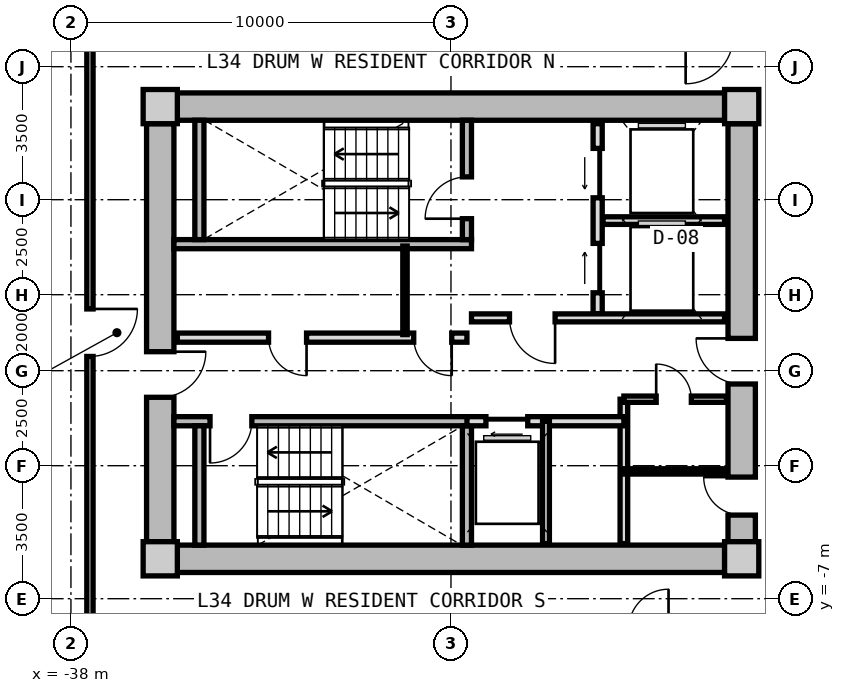
"""IFC4 building model, lengths in metres.
Left out: names, types, materials, properties, quantities, classifications, styles, units other than length and angle.
Written with IfcOpenShell. Run it as: python <this file> out.ifc"""

import sys

from ifc_helpers import new_model, si_unit, direction, frame, frame_2d, origin, origin_2d, place, context, subcontext, project, spatial, rectangle, extrude, source, transform, mapped, element, fill, save


model = new_model("IFC4")
c1 = context("Model", 3, precision=1e-05, world=origin(), true_north=direction((0.0, 1.0)))
c2 = subcontext(c1, "Body", "Model", "MODEL_VIEW")
j1 = project(units=[si_unit("LENGTHUNIT", "METRE"), si_unit("PLANEANGLEUNIT", "RADIAN")], contexts=[c1])
p1 = place(None, origin())
s1 = spatial("IfcSite", under=j1, at=p1, CompositionType="ELEMENT")
p2 = place(p1, origin())
s2 = spatial("IfcBuilding", under=s1, at=p2, CompositionType="ELEMENT")
p3 = place(p2, frame((0.0, 0.0, 111.5)))
s3 = spatial("IfcBuildingStorey", under=s2, at=p3, CompositionType="ELEMENT", Elevation=111.5)
m1 = source(origin(), c2, "Body", "SweptSolid", [
    extrude(rectangle(XDim=0.9, YDim=0.9, at=origin_2d()), origin(), (0.0, 0.0, 1.0), 3.05),
])
for number, where, z_axis, x_axis in (
    (1, (-35.65, -5.95, 0.0), (0.0, 0.0, 1.0), (1.0, 0.0, 0.0)),
    (2, (-20.35, -5.95, 0.0), (0.0, 0.0, 1.0), (1.0, 0.0, 0.0)),
    (3, (-20.35, 5.95, 0.0), (0.0, 0.0, 1.0), (1.0, 0.0, 0.0)),
    (4, (-35.65, 5.95, 0.0), (0.0, 0.0, 1.0), (1.0, 0.0, 0.0)),
):
    element("IfcColumn", number, at=place(p3, frame(where, z_axis=z_axis, x_axis=x_axis)), inside=s3, PredefinedType="COLUMN", context=c2, shape_type="MappedRepresentation", body=[
        mapped(m1, transform((0.0, 0.0, 0.0), x_axis=(1.0, 0.0, 0.0), y_axis=(0.0, 1.0, 0.0), z_axis=(0.0, 0.0, 1.0), scale=1.0)),
    ])
m2 = source(origin(), c2, "Body", "SweptSolid", [
    extrude(rectangle(XDim=14.4, YDim=0.72, at=frame_2d((7.2, 0.0))), origin(), (0.0, 0.0, 1.0), 2.79),
])
for number, where, z_axis, x_axis in (
    (5, (-35.2, 5.95, 0.0), (0.0, 0.0, 1.0), (1.0, 0.0, 0.0)),
    (6, (-20.8, -5.95, 0.0), (0.0, 0.0, 1.0), (-1.0, 0.0, 0.0)),
):
    element("IfcWall", number, at=place(p3, frame(where, z_axis=z_axis, x_axis=x_axis)), inside=s3, PredefinedType="SHEAR", context=c2, shape_type="MappedRepresentation", body=[
        mapped(m2, transform((0.0, 0.0, 0.0), x_axis=(1.0, 0.0, 0.0), y_axis=(0.0, 1.0, 0.0), z_axis=(0.0, 0.0, 1.0), scale=1.0)),
    ])
m3 = source(origin(), c2, "Body", "SweptSolid", [
    extrude(rectangle(XDim=11.0, YDim=0.72, at=frame_2d((5.5, 0.0))), origin(), (0.0, 0.0, 1.0), 2.79),
])
p4 = place(p3, frame((-35.65, -5.5, 0.0), z_axis=(0.0, 0.0, 1.0), x_axis=(0.0, 1.0, 0.0)))
e7 = element("IfcWall", 7, at=p4, inside=s3, PredefinedType="SHEAR", context=c2, shape_type="MappedRepresentation", body=[
    mapped(m3, transform((0.0, 0.0, 0.0), x_axis=(1.0, 0.0, 0.0), y_axis=(0.0, 1.0, 0.0), z_axis=(0.0, 0.0, 1.0), scale=1.0)),
])
p5 = place(p4, frame((3.8, 0.0, 0.0)))
e8 = element("IfcOpeningElement", 8, at=p5, cuts=e7, PredefinedType="OPENING", context=c2, shape_type="SweptSolid", body=[
    extrude(rectangle(XDim=1.2, YDim=2.15, at=frame_2d((0.6, 1.075))), frame((0.0, 0.37, 0.0), z_axis=(0.0, -1.0, 0.0), x_axis=(1.0, 0.0, 0.0)), (0.0, 0.0, 1.0), 0.74),
])
p6 = place(p3, frame((-20.35, 5.5, 0.0), z_axis=(0.0, 0.0, 1.0), x_axis=(0.0, -1.0, 0.0)))
e9 = element("IfcWall", 9, at=p6, inside=s3, PredefinedType="SHEAR", context=c2, shape_type="MappedRepresentation", body=[
    mapped(m3, transform((0.0, 0.0, 0.0), x_axis=(1.0, 0.0, 0.0), y_axis=(0.0, 1.0, 0.0), z_axis=(0.0, 0.0, 1.0), scale=1.0)),
])
p7 = place(p6, frame((5.65, 0.0, 0.0)))
e10 = element("IfcOpeningElement", 10, at=p7, cuts=e9, PredefinedType="OPENING", context=c2, shape_type="SweptSolid", body=[
    extrude(rectangle(XDim=1.2, YDim=2.15, at=frame_2d((0.6, 1.075))), frame((0.0, 0.37, 0.0), z_axis=(0.0, -1.0, 0.0), x_axis=(1.0, 0.0, 0.0)), (0.0, 0.0, 1.0), 0.74),
])
p8 = place(p6, frame((9.3, 0.0, 0.0)))
e11 = element("IfcOpeningElement", 11, at=p8, cuts=e9, PredefinedType="OPENING", context=c2, shape_type="SweptSolid", body=[
    extrude(rectangle(XDim=1.0, YDim=2.1, at=frame_2d((0.5, 1.05))), frame((0.0, 0.37, 0.0), z_axis=(0.0, -1.0, 0.0), x_axis=(1.0, 0.0, 0.0)), (0.0, 0.0, 1.0), 0.74),
])
m4 = source(origin(), c2, "Body", "SweptSolid", [
    extrude(rectangle(XDim=7.83, YDim=0.24, at=frame_2d((3.915, 0.0))), origin(), (0.0, 0.0, 1.0), 2.79),
])
p9 = place(p3, frame((-35.29, 2.33, 0.0), z_axis=(0.0, 0.0, 1.0), x_axis=(1.0, 0.0, 0.0)))
e12 = element("IfcWall", 12, at=p9, inside=s3, PredefinedType="PARTITIONING", context=c2, shape_type="MappedRepresentation", body=[
    mapped(m4, transform((0.0, 0.0, 0.0), x_axis=(1.0, 0.0, 0.0), y_axis=(0.0, 1.0, 0.0), z_axis=(0.0, 0.0, 1.0), scale=1.0)),
])
m5 = source(origin(), c2, "Body", "SweptSolid", [
    extrude(rectangle(XDim=3.14, YDim=0.24, at=frame_2d((1.57, 0.0))), origin(), (0.0, 0.0, 1.0), 2.79),
])
p10 = place(p3, frame((-34.62, 2.45, 0.0), z_axis=(0.0, 0.0, 1.0), x_axis=(0.0, 1.0, 0.0)))
e13 = element("IfcWall", 13, at=p10, inside=s3, PredefinedType="PARTITIONING", context=c2, shape_type="MappedRepresentation", body=[
    mapped(m5, transform((0.0, 0.0, 0.0), x_axis=(1.0, 0.0, 0.0), y_axis=(0.0, 1.0, 0.0), z_axis=(0.0, 0.0, 1.0), scale=1.0)),
])
p11 = place(p3, frame((-27.58, 2.45, 0.0), z_axis=(0.0, 0.0, 1.0), x_axis=(0.0, 1.0, 0.0)))
e14 = element("IfcWall", 14, at=p11, inside=s3, PredefinedType="PARTITIONING", context=c2, shape_type="MappedRepresentation", body=[
    mapped(m5, transform((0.0, 0.0, 0.0), x_axis=(1.0, 0.0, 0.0), y_axis=(0.0, 1.0, 0.0), z_axis=(0.0, 0.0, 1.0), scale=1.0)),
])
p12 = place(p11, frame((0.55, 0.0, 0.0)))
e15 = element("IfcOpeningElement", 15, at=p12, cuts=e14, PredefinedType="OPENING", context=c2, shape_type="SweptSolid", body=[
    extrude(rectangle(XDim=1.1, YDim=2.15, at=frame_2d((0.55, 1.075))), frame((0.0, 0.13, 0.0), z_axis=(0.0, -1.0, 0.0), x_axis=(1.0, 0.0, 0.0)), (0.0, 0.0, 1.0), 0.26),
])
p13 = place(p3, frame((-35.29, -2.33, 0.0), z_axis=(0.0, 0.0, 1.0), x_axis=(1.0, 0.0, 0.0)))
e16 = element("IfcWall", 16, at=p13, inside=s3, PredefinedType="PARTITIONING", context=c2, shape_type="MappedRepresentation", body=[
    mapped(m4, transform((0.0, 0.0, 0.0), x_axis=(1.0, 0.0, 0.0), y_axis=(0.0, 1.0, 0.0), z_axis=(0.0, 0.0, 1.0), scale=1.0)),
])
p14 = place(p13, frame((0.95, 0.0, 0.0)))
e17 = element("IfcOpeningElement", 17, at=p14, cuts=e16, PredefinedType="OPENING", context=c2, shape_type="SweptSolid", body=[
    extrude(rectangle(XDim=1.1, YDim=2.15, at=frame_2d((0.55, 1.075))), frame((0.0, 0.13, 0.0), z_axis=(0.0, -1.0, 0.0), x_axis=(1.0, 0.0, 0.0)), (0.0, 0.0, 1.0), 0.26),
])
for number, where, z_axis, x_axis in (
    (18, (-34.62, -5.59, 0.0), (0.0, 0.0, 1.0), (0.0, 1.0, 0.0)),
    (19, (-27.58, -5.59, 0.0), (0.0, 0.0, 1.0), (0.0, 1.0, 0.0)),
):
    element("IfcWall", number, at=place(p3, frame(where, z_axis=z_axis, x_axis=x_axis)), inside=s3, PredefinedType="PARTITIONING", context=c2, shape_type="MappedRepresentation", body=[
        mapped(m5, transform((0.0, 0.0, 0.0), x_axis=(1.0, 0.0, 0.0), y_axis=(0.0, 1.0, 0.0), z_axis=(0.0, 0.0, 1.0), scale=1.0)),
    ])
m6 = source(origin(), c2, "Body", "SweptSolid", [
    extrude(rectangle(XDim=5.0, YDim=0.24, at=frame_2d((2.5, 0.0))), origin(), (0.0, 0.0, 1.0), 2.775),
])
p15 = place(p3, frame((-24.14, 0.5, 0.0), z_axis=(0.0, 0.0, 1.0), x_axis=(0.0, 1.0, 0.0)))
e20 = element("IfcWall", 20, at=p15, inside=s3, PredefinedType="PARTITIONING", context=c2, shape_type="MappedRepresentation", body=[
    mapped(m6, transform((0.0, 0.0, 0.0), x_axis=(1.0, 0.0, 0.0), y_axis=(0.0, 1.0, 0.0), z_axis=(0.0, 0.0, 1.0), scale=1.0)),
])
p16 = place(p15, frame((3.05, 0.0, 0.0)))
e21 = element("IfcOpeningElement", 21, at=p16, cuts=e20, PredefinedType="OPENING", context=c2, shape_type="SweptSolid", body=[
    extrude(rectangle(XDim=1.3, YDim=2.2, at=frame_2d((0.65, 1.1))), frame((0.0, 0.13, 0.0), z_axis=(0.0, -1.0, 0.0), x_axis=(1.0, 0.0, 0.0)), (0.0, 0.0, 1.0), 0.26),
])
p17 = place(p15, frame((0.55, 0.0, 0.0)))
e22 = element("IfcOpeningElement", 22, at=p17, cuts=e20, PredefinedType="OPENING", context=c2, shape_type="SweptSolid", body=[
    extrude(rectangle(XDim=1.3, YDim=2.2, at=frame_2d((0.65, 1.1))), frame((0.0, 0.13, 0.0), z_axis=(0.0, -1.0, 0.0), x_axis=(1.0, 0.0, 0.0)), (0.0, 0.0, 1.0), 0.26),
])
m7 = source(origin(), c2, "Body", "SweptSolid", [
    extrude(rectangle(XDim=3.2, YDim=0.2, at=frame_2d((1.6, 0.0))), origin(), (0.0, 0.0, 1.0), 2.775),
])
p18 = place(p3, frame((-24.0, 2.95, 0.0), z_axis=(0.0, 0.0, 1.0), x_axis=(1.0, 0.0, 0.0)))
e23 = element("IfcWall", 23, at=p18, inside=s3, PredefinedType="PARTITIONING", context=c2, shape_type="MappedRepresentation", body=[
    mapped(m7, transform((0.0, 0.0, 0.0), x_axis=(1.0, 0.0, 0.0), y_axis=(0.0, 1.0, 0.0), z_axis=(0.0, 0.0, 1.0), scale=1.0)),
])
m8 = source(origin(), c2, "Body", "SweptSolid", [
    extrude(rectangle(XDim=6.66, YDim=0.21, at=frame_2d((3.33, 0.0))), origin(), (0.0, 0.0, 1.0), 2.775),
])
p19 = place(p3, frame((-27.46, 0.39, 0.0), z_axis=(0.0, 0.0, 1.0), x_axis=(1.0, 0.0, 0.0)))
e24 = element("IfcWall", 24, at=p19, inside=s3, PredefinedType="PARTITIONING", context=c2, shape_type="MappedRepresentation", body=[
    mapped(m8, transform((0.0, 0.0, 0.0), x_axis=(1.0, 0.0, 0.0), y_axis=(0.0, 1.0, 0.0), z_axis=(0.0, 0.0, 1.0), scale=1.0)),
])
p20 = place(p19, frame((1.0, 0.0, 0.0)))
e25 = element("IfcOpeningElement", 25, at=p20, cuts=e24, PredefinedType="OPENING", context=c2, shape_type="SweptSolid", body=[
    extrude(rectangle(XDim=1.2, YDim=2.15, at=frame_2d((0.6, 1.075))), frame((0.0, 0.115, 0.0), z_axis=(0.0, -1.0, 0.0), x_axis=(1.0, 0.0, 0.0)), (0.0, 0.0, 1.0), 0.23),
])
m9 = source(origin(), c2, "Body", "SweptSolid", [
    extrude(rectangle(XDim=7.62, YDim=0.24, at=frame_2d((3.81, 0.0))), origin(), (0.0, 0.0, 1.0), 2.775),
])
p21 = place(p3, frame((-35.2, -0.13, 0.0), z_axis=(0.0, 0.0, 1.0), x_axis=(1.0, 0.0, 0.0)))
e26 = element("IfcWall", 26, at=p21, inside=s3, PredefinedType="PARTITIONING", context=c2, shape_type="MappedRepresentation", body=[
    mapped(m9, transform((0.0, 0.0, 0.0), x_axis=(1.0, 0.0, 0.0), y_axis=(0.0, 1.0, 0.0), z_axis=(0.0, 0.0, 1.0), scale=1.0)),
])
p22 = place(p21, frame((6.22, 0.0, 0.0)))
e27 = element("IfcOpeningElement", 27, at=p22, cuts=e26, PredefinedType="OPENING", context=c2, shape_type="SweptSolid", body=[
    extrude(rectangle(XDim=1.0, YDim=2.1, at=frame_2d((0.5, 1.05))), frame((0.0, 0.13, 0.0), z_axis=(0.0, -1.0, 0.0), x_axis=(1.0, 0.0, 0.0)), (0.0, 0.0, 1.0), 0.26),
])
p23 = place(p21, frame((2.4, 0.0, 0.0)))
e28 = element("IfcOpeningElement", 28, at=p23, cuts=e26, PredefinedType="OPENING", context=c2, shape_type="SweptSolid", body=[
    extrude(rectangle(XDim=1.0, YDim=2.1, at=frame_2d((0.5, 1.05))), frame((0.0, 0.13, 0.0), z_axis=(0.0, -1.0, 0.0), x_axis=(1.0, 0.0, 0.0)), (0.0, 0.0, 1.0), 0.26),
])
m10 = source(origin(), c2, "Body", "SweptSolid", [
    extrude(rectangle(XDim=2.33, YDim=0.115, at=frame_2d((1.165, 0.0))), origin(), (0.0, 0.0, 1.0), 2.775),
])
p24 = place(p3, frame((-29.21, -0.05, 0.0), z_axis=(0.0, 0.0, 1.0), x_axis=(0.0, 1.0, 0.0)))
e29 = element("IfcWall", 29, at=p24, inside=s3, PredefinedType="PARTITIONING", context=c2, shape_type="MappedRepresentation", body=[
    mapped(m10, transform((0.0, 0.0, 0.0), x_axis=(1.0, 0.0, 0.0), y_axis=(0.0, 1.0, 0.0), z_axis=(0.0, 0.0, 1.0), scale=1.0)),
])
m11 = source(origin(), c2, "Body", "SweptSolid", [
    extrude(rectangle(XDim=3.8, YDim=0.2, at=frame_2d((1.9, 0.0))), origin(), (0.0, 0.0, 1.0), 2.775),
])
p25 = place(p3, frame((-23.45, -5.55, 0.0), z_axis=(0.0, 0.0, 1.0), x_axis=(0.0, 1.0, 0.0)))
e30 = element("IfcWall", 30, at=p25, inside=s3, PredefinedType="PARTITIONING", context=c2, shape_type="MappedRepresentation", body=[
    mapped(m11, transform((0.0, 0.0, 0.0), x_axis=(1.0, 0.0, 0.0), y_axis=(0.0, 1.0, 0.0), z_axis=(0.0, 0.0, 1.0), scale=1.0)),
])
m12 = source(origin(), c2, "Body", "SweptSolid", [
    extrude(rectangle(XDim=4.13, YDim=0.24, at=frame_2d((2.065, 0.0))), origin(), (0.0, 0.0, 1.0), 2.775),
])
p26 = place(p3, frame((-27.58, -2.33, 0.0), z_axis=(0.0, 0.0, 1.0), x_axis=(1.0, 0.0, 0.0)))
e31 = element("IfcWall", 31, at=p26, inside=s3, PredefinedType="PARTITIONING", context=c2, shape_type="MappedRepresentation", body=[
    mapped(m12, transform((0.0, 0.0, 0.0), x_axis=(1.0, 0.0, 0.0), y_axis=(0.0, 1.0, 0.0), z_axis=(0.0, 0.0, 1.0), scale=1.0)),
])
p27 = place(p26, frame((0.5, 0.0, 0.0)))
e32 = element("IfcOpeningElement", 32, at=p27, cuts=e31, PredefinedType="OPENING", context=c2, shape_type="SweptSolid", body=[
    extrude(rectangle(XDim=1.1, YDim=2.2, at=frame_2d((0.55, 1.1))), frame((0.0, 0.13, 0.0), z_axis=(0.0, -1.0, 0.0), x_axis=(1.0, 0.0, 0.0)), (0.0, 0.0, 1.0), 0.26),
])
m13 = source(origin(), c2, "Body", "SweptSolid", [
    extrude(rectangle(XDim=3.22, YDim=0.18, at=frame_2d((1.61, 0.0))), origin(), (0.0, 0.0, 1.0), 2.775),
])
p28 = place(p3, frame((-25.5, -5.55, 0.0), z_axis=(0.0, 0.0, 1.0), x_axis=(0.0, 1.0, 0.0)))
e33 = element("IfcWall", 33, at=p28, inside=s3, PredefinedType="PARTITIONING", context=c2, shape_type="MappedRepresentation", body=[
    mapped(m13, transform((0.0, 0.0, 0.0), x_axis=(1.0, 0.0, 0.0), y_axis=(0.0, 1.0, 0.0), z_axis=(0.0, 0.0, 1.0), scale=1.0)),
])
m14 = source(origin(), c2, "Body", "SweptSolid", [
    extrude(rectangle(XDim=2.7, YDim=0.165, at=frame_2d((1.35, 0.0))), origin(), (0.0, 0.0, 1.0), 2.775),
])
p29 = place(p3, frame((-23.45, -1.75, 0.0), z_axis=(0.0, 0.0, 1.0), x_axis=(1.0, 0.0, 0.0)))
e34 = element("IfcWall", 34, at=p29, inside=s3, PredefinedType="PARTITIONING", context=c2, shape_type="MappedRepresentation", body=[
    mapped(m14, transform((0.0, 0.0, 0.0), x_axis=(1.0, 0.0, 0.0), y_axis=(0.0, 1.0, 0.0), z_axis=(0.0, 0.0, 1.0), scale=1.0)),
])
p30 = place(p29, frame((0.85, 0.0, 0.0)))
e35 = element("IfcOpeningElement", 35, at=p30, cuts=e34, PredefinedType="OPENING", context=c2, shape_type="SweptSolid", body=[
    extrude(rectangle(XDim=0.925, YDim=2.1, at=frame_2d((0.462, 1.05))), frame((0.0, 0.093, 0.0), z_axis=(0.0, -1.0, 0.0), x_axis=(1.0, 0.0, 0.0)), (0.0, 0.0, 1.0), 0.185),
])
m15 = source(origin(), c2, "Body", "SweptSolid", [
    extrude(rectangle(XDim=2.7, YDim=0.14, at=frame_2d((1.35, 0.0))), origin(), (0.0, 0.0, 1.0), 2.775),
])
p31 = place(p3, frame((-23.45, -3.65, 0.0), z_axis=(0.0, 0.0, 1.0), x_axis=(1.0, 0.0, 0.0)))
e36 = element("IfcWall", 36, at=p31, inside=s3, PredefinedType="PARTITIONING", context=c2, shape_type="MappedRepresentation", body=[
    mapped(m15, transform((0.0, 0.0, 0.0), x_axis=(1.0, 0.0, 0.0), y_axis=(0.0, 1.0, 0.0), z_axis=(0.0, 0.0, 1.0), scale=1.0)),
])
m16 = source(origin(), c2, "Body", "SweptSolid", [
    extrude(rectangle(XDim=15.6, YDim=0.165, at=frame_2d((7.8, 0.0))), origin(), (0.0, 0.0, 1.0), 2.775),
])
p32 = place(p3, frame((-37.5, -7.8, 0.0), z_axis=(0.0, 0.0, 1.0), x_axis=(0.0, 1.0, 0.0)))
e37 = element("IfcWall", 37, at=p32, inside=s3, PredefinedType="PARTITIONING", context=c2, shape_type="MappedRepresentation", body=[
    mapped(m16, transform((0.0, 0.0, 0.0), x_axis=(1.0, 0.0, 0.0), y_axis=(0.0, 1.0, 0.0), z_axis=(0.0, 0.0, 1.0), scale=1.0)),
])
p33 = place(p32, frame((7.175, 0.0, 0.0)))
e38 = element("IfcOpeningElement", 38, at=p33, cuts=e37, PredefinedType="OPENING", context=c2, shape_type="SweptSolid", body=[
    extrude(rectangle(XDim=1.25, YDim=2.2, at=frame_2d((0.625, 1.1))), frame((0.0, 0.093, 0.0), z_axis=(0.0, -1.0, 0.0), x_axis=(1.0, 0.0, 0.0)), (0.0, 0.0, 1.0), 0.185),
])
m17 = source(origin(), c2, "Body", "SweptSolid", [
    extrude(rectangle(XDim=1.1, YDim=2.15, at=frame_2d((0.55, 1.075))), frame((0.0, 0.025, 0.0), z_axis=(0.0, -1.0, 0.0), x_axis=(1.0, 0.0, 0.0)), (0.0, 0.0, 1.0), 0.05),
])
p34 = place(p12, origin())
e39 = element("IfcDoor", 39, at=p34, inside=s3, OperationType="SINGLE_SWING_LEFT", PredefinedType="DOOR", context=c2, shape_type="MappedRepresentation", body=[
    mapped(m17, transform((0.0, 0.0, 0.0), x_axis=(1.0, 0.0, 0.0), y_axis=(0.0, 1.0, 0.0), z_axis=(0.0, 0.0, 1.0), scale=1.0)),
])
fill(e15, e39)
p35 = place(p14, frame((1.1, 0.0, 0.0), z_axis=(0.0, 0.0, 1.0), x_axis=(-1.0, 0.0, 0.0)))
e40 = element("IfcDoor", 40, at=p35, inside=s3, OperationType="SINGLE_SWING_RIGHT", PredefinedType="DOOR", context=c2, shape_type="MappedRepresentation", body=[
    mapped(m17, transform((0.0, 0.0, 0.0), x_axis=(1.0, 0.0, 0.0), y_axis=(0.0, 1.0, 0.0), z_axis=(0.0, 0.0, 1.0), scale=1.0)),
])
fill(e17, e40)
m18 = source(origin(), c2, "Body", "SweptSolid", [
    extrude(rectangle(XDim=1.3, YDim=2.2, at=frame_2d((0.65, 1.1))), frame((0.0, 0.025, 0.0), z_axis=(0.0, -1.0, 0.0), x_axis=(1.0, 0.0, 0.0)), (0.0, 0.0, 1.0), 0.05),
])
p36 = place(p16, origin())
e41 = element("IfcDoor", 41, at=p36, inside=s3, OperationType="SLIDING_TO_LEFT", PredefinedType="DOOR", context=c2, shape_type="MappedRepresentation", body=[
    mapped(m18, transform((0.0, 0.0, 0.0), x_axis=(1.0, 0.0, 0.0), y_axis=(0.0, 1.0, 0.0), z_axis=(0.0, 0.0, 1.0), scale=1.0)),
])
fill(e21, e41)
p37 = place(p17, origin())
e42 = element("IfcDoor", 42, at=p37, inside=s3, OperationType="SLIDING_TO_RIGHT", PredefinedType="DOOR", context=c2, shape_type="MappedRepresentation", body=[
    mapped(m18, transform((0.0, 0.0, 0.0), x_axis=(1.0, 0.0, 0.0), y_axis=(0.0, 1.0, 0.0), z_axis=(0.0, 0.0, 1.0), scale=1.0)),
])
fill(e22, e42)
m19 = source(origin(), c2, "Body", "SweptSolid", [
    extrude(rectangle(XDim=1.2, YDim=2.15, at=frame_2d((0.6, 1.075))), frame((0.0, 0.025, 0.0), z_axis=(0.0, -1.0, 0.0), x_axis=(1.0, 0.0, 0.0)), (0.0, 0.0, 1.0), 0.05),
])
p38 = place(p20, frame((1.2, 0.0, 0.0), z_axis=(0.0, 0.0, 1.0), x_axis=(-1.0, 0.0, 0.0)))
e43 = element("IfcDoor", 43, at=p38, inside=s3, OperationType="SINGLE_SWING_LEFT", PredefinedType="DOOR", context=c2, shape_type="MappedRepresentation", body=[
    mapped(m19, transform((0.0, 0.0, 0.0), x_axis=(1.0, 0.0, 0.0), y_axis=(0.0, 1.0, 0.0), z_axis=(0.0, 0.0, 1.0), scale=1.0)),
])
fill(e25, e43)
p39 = place(p5, frame((1.2, 0.0, 0.0), z_axis=(0.0, 0.0, 1.0), x_axis=(-1.0, 0.0, 0.0)))
e44 = element("IfcDoor", 44, at=p39, inside=s3, OperationType="SINGLE_SWING_LEFT", PredefinedType="DOOR", context=c2, shape_type="MappedRepresentation", body=[
    mapped(m19, transform((0.0, 0.0, 0.0), x_axis=(1.0, 0.0, 0.0), y_axis=(0.0, 1.0, 0.0), z_axis=(0.0, 0.0, 1.0), scale=1.0)),
])
fill(e8, e44)
p40 = place(p7, frame((1.2, 0.0, 0.0), z_axis=(0.0, 0.0, 1.0), x_axis=(-1.0, 0.0, 0.0)))
e45 = element("IfcDoor", 45, at=p40, inside=s3, OperationType="SINGLE_SWING_RIGHT", PredefinedType="DOOR", context=c2, shape_type="MappedRepresentation", body=[
    mapped(m19, transform((0.0, 0.0, 0.0), x_axis=(1.0, 0.0, 0.0), y_axis=(0.0, 1.0, 0.0), z_axis=(0.0, 0.0, 1.0), scale=1.0)),
])
fill(e10, e45)
m20 = source(origin(), c2, "Body", "SweptSolid", [
    extrude(rectangle(XDim=1.0, YDim=2.1, at=frame_2d((0.5, 1.05))), frame((0.0, 0.025, 0.0), z_axis=(0.0, -1.0, 0.0), x_axis=(1.0, 0.0, 0.0)), (0.0, 0.0, 1.0), 0.05),
])
p41 = place(p22, frame((1.0, 0.0, 0.0), z_axis=(0.0, 0.0, 1.0), x_axis=(-1.0, 0.0, 0.0)))
e46 = element("IfcDoor", 46, at=p41, inside=s3, OperationType="SINGLE_SWING_LEFT", PredefinedType="DOOR", context=c2, shape_type="MappedRepresentation", body=[
    mapped(m20, transform((0.0, 0.0, 0.0), x_axis=(1.0, 0.0, 0.0), y_axis=(0.0, 1.0, 0.0), z_axis=(0.0, 0.0, 1.0), scale=1.0)),
])
fill(e27, e46)
p42 = place(p23, frame((1.0, 0.0, 0.0), z_axis=(0.0, 0.0, 1.0), x_axis=(-1.0, 0.0, 0.0)))
e47 = element("IfcDoor", 47, at=p42, inside=s3, OperationType="SINGLE_SWING_LEFT", PredefinedType="DOOR", context=c2, shape_type="MappedRepresentation", body=[
    mapped(m20, transform((0.0, 0.0, 0.0), x_axis=(1.0, 0.0, 0.0), y_axis=(0.0, 1.0, 0.0), z_axis=(0.0, 0.0, 1.0), scale=1.0)),
])
fill(e28, e47)
m21 = source(origin(), c2, "Body", "SweptSolid", [
    extrude(rectangle(XDim=1.1, YDim=2.2, at=frame_2d((0.55, 1.1))), frame((0.0, 0.025, 0.0), z_axis=(0.0, -1.0, 0.0), x_axis=(1.0, 0.0, 0.0)), (0.0, 0.0, 1.0), 0.05),
])
p43 = place(p27, frame((1.1, 0.0, 0.0), z_axis=(0.0, 0.0, 1.0), x_axis=(-1.0, 0.0, 0.0)))
e48 = element("IfcDoor", 48, at=p43, inside=s3, OperationType="SLIDING_TO_LEFT", PredefinedType="DOOR", context=c2, shape_type="MappedRepresentation", body=[
    mapped(m21, transform((0.0, 0.0, 0.0), x_axis=(1.0, 0.0, 0.0), y_axis=(0.0, 1.0, 0.0), z_axis=(0.0, 0.0, 1.0), scale=1.0)),
])
fill(e32, e48)
m22 = source(origin(), c2, "Body", "SweptSolid", [
    extrude(rectangle(XDim=0.925, YDim=2.1, at=frame_2d((0.462, 1.05))), frame((0.0, 0.025, 0.0), z_axis=(0.0, -1.0, 0.0), x_axis=(1.0, 0.0, 0.0)), (0.0, 0.0, 1.0), 0.05),
])
p44 = place(p30, origin())
e49 = element("IfcDoor", 49, at=p44, inside=s3, OperationType="SINGLE_SWING_LEFT", PredefinedType="DOOR", context=c2, shape_type="MappedRepresentation", body=[
    mapped(m22, transform((0.0, 0.0, 0.0), x_axis=(1.0, 0.0, 0.0), y_axis=(0.0, 1.0, 0.0), z_axis=(0.0, 0.0, 1.0), scale=1.0)),
])
fill(e35, e49)
p45 = place(p8, frame((1.0, 0.0, 0.0), z_axis=(0.0, 0.0, 1.0), x_axis=(-1.0, 0.0, 0.0)))
e50 = element("IfcDoor", 50, at=p45, inside=s3, OperationType="SINGLE_SWING_RIGHT", PredefinedType="DOOR", context=c2, shape_type="MappedRepresentation", body=[
    mapped(m20, transform((0.0, 0.0, 0.0), x_axis=(1.0, 0.0, 0.0), y_axis=(0.0, 1.0, 0.0), z_axis=(0.0, 0.0, 1.0), scale=1.0)),
])
fill(e11, e50)
m23 = source(origin(), c2, "Body", "SweptSolid", [
    extrude(rectangle(XDim=1.25, YDim=2.2, at=frame_2d((0.625, 1.1))), frame((0.0, 0.025, 0.0), z_axis=(0.0, -1.0, 0.0), x_axis=(1.0, 0.0, 0.0)), (0.0, 0.0, 1.0), 0.05),
])
p46 = place(p33, frame((1.25, 0.0, 0.0), z_axis=(0.0, 0.0, 1.0), x_axis=(-1.0, 0.0, 0.0)))
e51 = element("IfcDoor", 51, at=p46, inside=s3, OperationType="SINGLE_SWING_LEFT", PredefinedType="DOOR", context=c2, shape_type="MappedRepresentation", body=[
    mapped(m23, transform((0.0, 0.0, 0.0), x_axis=(1.0, 0.0, 0.0), y_axis=(0.0, 1.0, 0.0), z_axis=(0.0, 0.0, 1.0), scale=1.0)),
])
fill(e38, e51)
save(model, sys.argv[1])
